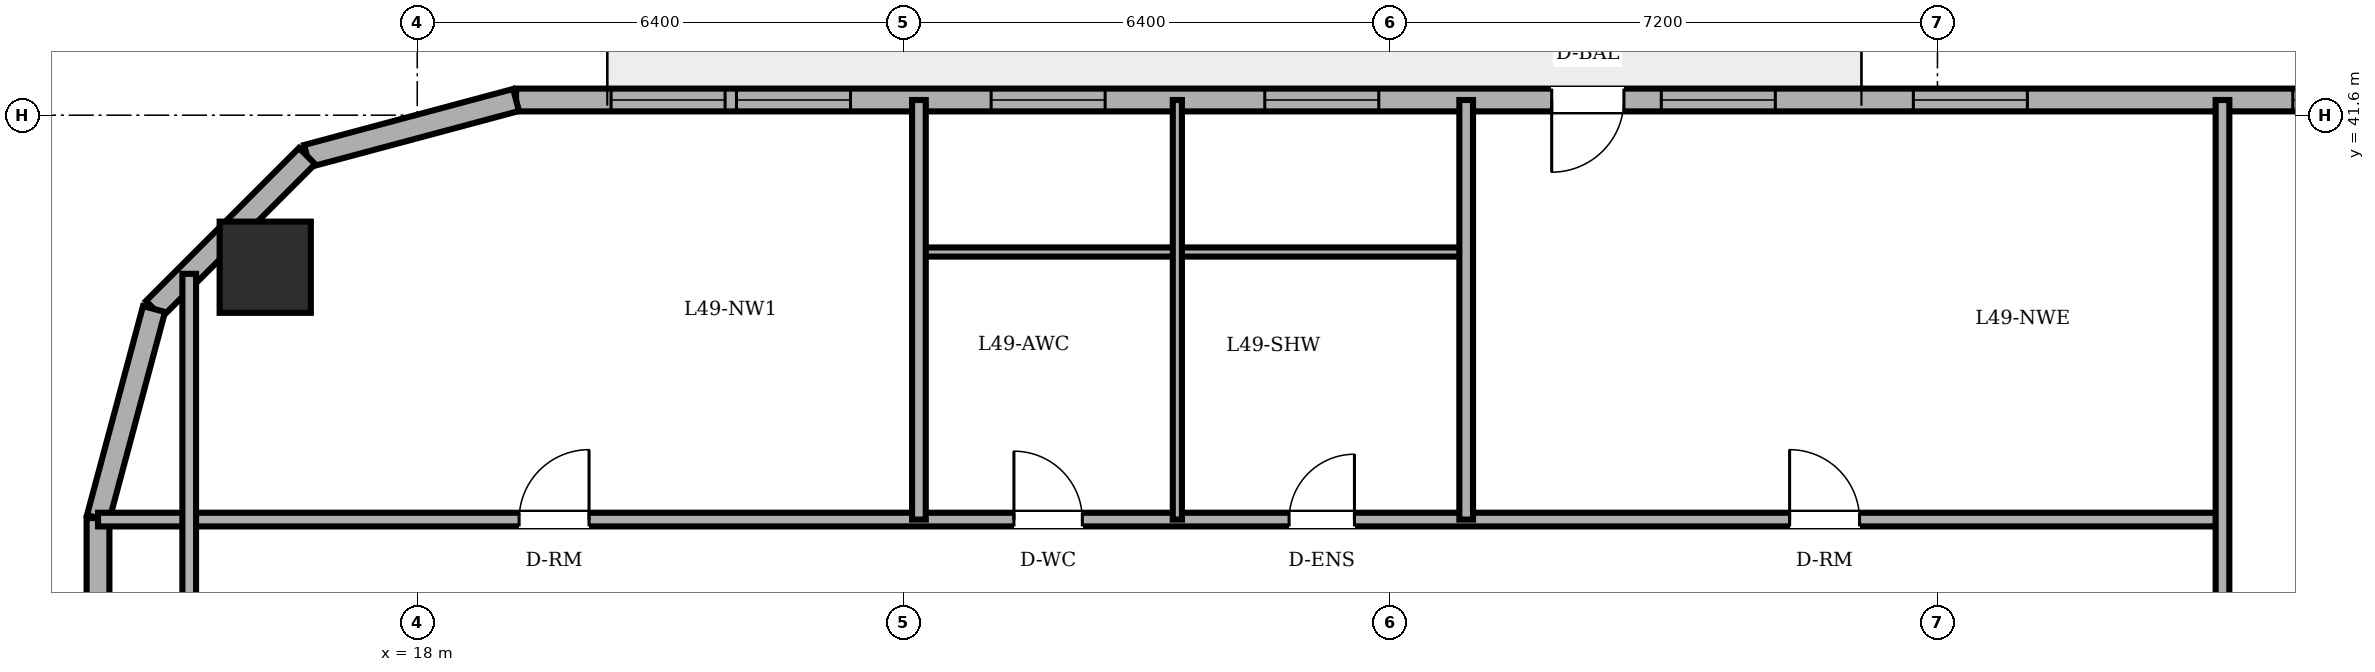
"""IFC4 building model, lengths in metres.
Left out: names, types, materials, properties, quantities, classifications, styles, units other than length and angle.
Written with IfcOpenShell. Run it as: python <this file> out.ifc"""

import sys

from ifc_helpers import new_model, si_unit, direction, frame, frame_2d, origin, origin_2d, place, context, subcontext, project, spatial, rectangle, circle, extrude, element, fill, save


model = new_model("IFC4")
c1 = context("Model", 3, precision=1e-05, world=origin(), true_north=direction((0.0, 1.0)))
c2 = subcontext(c1, "Body", "Model", "MODEL_VIEW")
j1 = project(units=[si_unit("LENGTHUNIT", "METRE"), si_unit("PLANEANGLEUNIT", "RADIAN")], contexts=[c1])
p1 = place(None, origin())
s1 = spatial("IfcSite", under=j1, at=p1, CompositionType="ELEMENT")
p2 = place(p1, origin())
s2 = spatial("IfcBuilding", under=s1, at=p2, CompositionType="ELEMENT")
p3 = place(p2, frame((0.0, 0.0, 187.0)))
s3 = spatial("IfcBuildingStorey", under=s2, at=p3, CompositionType="ELEMENT", Elevation=187.0)
p4 = place(p3, frame((16.0, 39.6, 0.0), z_axis=(0.0, 0.0, 1.0), x_axis=(1.0, 0.0, 0.0)))
e1 = element("IfcColumn", 1, at=p4, inside=s3, PredefinedType="COLUMN", context=c2, shape_type="SweptSolid", body=[
    extrude(circle(Radius=0.6, at=origin_2d()), origin(), (0.0, 0.0, 1.0), 3.6),
])
p5 = place(p3, frame((49.582, 41.8, 0.0), z_axis=(0.0, 0.0, 1.0), x_axis=(-1.0, 0.0, 0.0)))
e2 = element("IfcWall", 2, at=p5, inside=s3, PredefinedType="SOLIDWALL", context=c2, shape_type="SweptSolid", body=[
    extrude(rectangle(XDim=30.282, YDim=0.3, at=frame_2d((15.141, 0.0))), origin(), (0.0, 0.0, 1.0), 3.36),
])
p6 = place(p5, frame((15.707, 0.0, 0.0)))
e3 = element("IfcOpeningElement", 3, at=p6, cuts=e2, PredefinedType="OPENING", context=c2, shape_type="SweptSolid", body=[
    extrude(rectangle(XDim=0.95, YDim=2.2, at=frame_2d((0.475, 1.1))), frame((0.0, 0.16, 0.0), z_axis=(0.0, -1.0, 0.0), x_axis=(1.0, 0.0, 0.0)), (0.0, 0.0, 1.0), 0.32),
])
p7 = place(p5, frame((0.828, 0.0, 0.85)))
e4 = element("IfcOpeningElement", 4, at=p7, cuts=e2, PredefinedType="OPENING", context=c2, shape_type="SweptSolid", body=[
    extrude(rectangle(XDim=1.5, YDim=1.55, at=frame_2d((0.75, 0.775))), frame((0.0, 0.16, 0.0), z_axis=(0.0, -1.0, 0.0), x_axis=(1.0, 0.0, 0.0)), (0.0, 0.0, 1.0), 0.32),
])
p8 = place(p5, frame((3.731, 0.0, 0.85)))
e5 = element("IfcOpeningElement", 5, at=p8, cuts=e2, PredefinedType="OPENING", context=c2, shape_type="SweptSolid", body=[
    extrude(rectangle(XDim=1.5, YDim=1.55, at=frame_2d((0.75, 0.775))), frame((0.0, 0.16, 0.0), z_axis=(0.0, -1.0, 0.0), x_axis=(1.0, 0.0, 0.0)), (0.0, 0.0, 1.0), 0.32),
])
p9 = place(p5, frame((5.407, 0.0, 0.85)))
e6 = element("IfcOpeningElement", 6, at=p9, cuts=e2, PredefinedType="OPENING", context=c2, shape_type="SweptSolid", body=[
    extrude(rectangle(XDim=1.5, YDim=1.55, at=frame_2d((0.75, 0.775))), frame((0.0, 0.16, 0.0), z_axis=(0.0, -1.0, 0.0), x_axis=(1.0, 0.0, 0.0)), (0.0, 0.0, 1.0), 0.32),
])
p10 = place(p5, frame((10.399, 0.0, 0.85)))
e7 = element("IfcOpeningElement", 7, at=p10, cuts=e2, PredefinedType="OPENING", context=c2, shape_type="SweptSolid", body=[
    extrude(rectangle(XDim=1.5, YDim=1.55, at=frame_2d((0.75, 0.775))), frame((0.0, 0.16, 0.0), z_axis=(0.0, -1.0, 0.0), x_axis=(1.0, 0.0, 0.0)), (0.0, 0.0, 1.0), 0.32),
])
p11 = place(p5, frame((13.715, 0.0, 0.85)))
e8 = element("IfcOpeningElement", 8, at=p11, cuts=e2, PredefinedType="OPENING", context=c2, shape_type="SweptSolid", body=[
    extrude(rectangle(XDim=1.5, YDim=1.55, at=frame_2d((0.75, 0.775))), frame((0.0, 0.16, 0.0), z_axis=(0.0, -1.0, 0.0), x_axis=(1.0, 0.0, 0.0)), (0.0, 0.0, 1.0), 0.32),
])
p12 = place(p5, frame((18.932, 0.0, 0.85)))
e9 = element("IfcOpeningElement", 9, at=p12, cuts=e2, PredefinedType="OPENING", context=c2, shape_type="SweptSolid", body=[
    extrude(rectangle(XDim=1.5, YDim=1.55, at=frame_2d((0.75, 0.775))), frame((0.0, 0.16, 0.0), z_axis=(0.0, -1.0, 0.0), x_axis=(1.0, 0.0, 0.0)), (0.0, 0.0, 1.0), 0.32),
])
p13 = place(p5, frame((22.532, 0.0, 0.85)))
e10 = element("IfcOpeningElement", 10, at=p13, cuts=e2, PredefinedType="OPENING", context=c2, shape_type="SweptSolid", body=[
    extrude(rectangle(XDim=1.5, YDim=1.55, at=frame_2d((0.75, 0.775))), frame((0.0, 0.16, 0.0), z_axis=(0.0, -1.0, 0.0), x_axis=(1.0, 0.0, 0.0)), (0.0, 0.0, 1.0), 0.32),
])
p14 = place(p5, frame((25.882, 0.0, 0.85)))
e11 = element("IfcOpeningElement", 11, at=p14, cuts=e2, PredefinedType="OPENING", context=c2, shape_type="SweptSolid", body=[
    extrude(rectangle(XDim=1.5, YDim=1.55, at=frame_2d((0.75, 0.775))), frame((0.0, 0.16, 0.0), z_axis=(0.0, -1.0, 0.0), x_axis=(1.0, 0.0, 0.0)), (0.0, 0.0, 1.0), 0.32),
])
p15 = place(p5, frame((27.532, 0.0, 0.85)))
e12 = element("IfcOpeningElement", 12, at=p15, cuts=e2, PredefinedType="OPENING", context=c2, shape_type="SweptSolid", body=[
    extrude(rectangle(XDim=1.5, YDim=1.55, at=frame_2d((0.75, 0.775))), frame((0.0, 0.16, 0.0), z_axis=(0.0, -1.0, 0.0), x_axis=(1.0, 0.0, 0.0)), (0.0, 0.0, 1.0), 0.32),
])
p16 = place(p3, frame((19.3, 41.8, 0.0), z_axis=(0.0, 0.0, 1.0), x_axis=(-0.965908238586, -0.258884674387, 0.0)))
e13 = element("IfcWall", 13, at=p16, inside=s3, PredefinedType="SOLIDWALL", context=c2, shape_type="SweptSolid", body=[
    extrude(rectangle(XDim=2.847, YDim=0.3, at=frame_2d((1.424, 0.0))), origin(), (0.0, 0.0, 1.0), 3.36),
])
p17 = place(p3, frame((16.55, 41.063, 0.0), z_axis=(0.0, 0.0, 1.0), x_axis=(-0.707106781187, -0.707106781187, 0.0)))
e14 = element("IfcWall", 14, at=p17, inside=s3, PredefinedType="SOLIDWALL", context=c2, shape_type="SweptSolid", body=[
    extrude(rectangle(XDim=2.847, YDim=0.3, at=frame_2d((1.423, 0.0))), origin(), (0.0, 0.0, 1.0), 3.36),
])
p18 = place(p3, frame((14.537, 39.05, 0.0), z_axis=(0.0, 0.0, 1.0), x_axis=(-0.258884674387, -0.965908238586, 0.0)))
e15 = element("IfcWall", 15, at=p18, inside=s3, PredefinedType="SOLIDWALL", context=c2, shape_type="SweptSolid", body=[
    extrude(rectangle(XDim=2.847, YDim=0.3, at=frame_2d((1.424, 0.0))), origin(), (0.0, 0.0, 1.0), 3.36),
])
p19 = place(p3, frame((13.8, 36.3, 0.0), z_axis=(0.0, 0.0, 1.0), x_axis=(0.0, -1.0, 0.0)))
e16 = element("IfcWall", 16, at=p19, inside=s3, PredefinedType="SOLIDWALL", context=c2, shape_type="SweptSolid", body=[
    extrude(rectangle(XDim=24.6, YDim=0.3, at=frame_2d((12.3, 0.0))), origin(), (0.0, 0.0, 1.0), 3.36),
])
p20 = place(p19, frame((5.003, 0.0, 0.85)))
e17 = element("IfcOpeningElement", 17, at=p20, cuts=e16, PredefinedType="OPENING", context=c2, shape_type="SweptSolid", body=[
    extrude(rectangle(XDim=1.5, YDim=1.55, at=frame_2d((0.75, 0.775))), frame((0.0, 0.16, 0.0), z_axis=(0.0, -1.0, 0.0), x_axis=(1.0, 0.0, 0.0)), (0.0, 0.0, 1.0), 0.32),
])
p21 = place(p19, frame((8.277, 0.0, 0.85)))
e18 = element("IfcOpeningElement", 18, at=p21, cuts=e16, PredefinedType="OPENING", context=c2, shape_type="SweptSolid", body=[
    extrude(rectangle(XDim=1.5, YDim=1.55, at=frame_2d((0.75, 0.775))), frame((0.0, 0.16, 0.0), z_axis=(0.0, -1.0, 0.0), x_axis=(1.0, 0.0, 0.0)), (0.0, 0.0, 1.0), 0.32),
])
p22 = place(p19, frame((14.823, 0.0, 0.85)))
e19 = element("IfcOpeningElement", 19, at=p22, cuts=e16, PredefinedType="OPENING", context=c2, shape_type="SweptSolid", body=[
    extrude(rectangle(XDim=1.5, YDim=1.55, at=frame_2d((0.75, 0.775))), frame((0.0, 0.16, 0.0), z_axis=(0.0, -1.0, 0.0), x_axis=(1.0, 0.0, 0.0)), (0.0, 0.0, 1.0), 0.32),
])
p23 = place(p19, frame((18.097, 0.0, 0.85)))
e20 = element("IfcOpeningElement", 20, at=p23, cuts=e16, PredefinedType="OPENING", context=c2, shape_type="SweptSolid", body=[
    extrude(rectangle(XDim=1.5, YDim=1.55, at=frame_2d((0.75, 0.775))), frame((0.0, 0.16, 0.0), z_axis=(0.0, -1.0, 0.0), x_axis=(1.0, 0.0, 0.0)), (0.0, 0.0, 1.0), 0.32),
])
p24 = place(p3, frame((13.8, 36.28, 0.0), z_axis=(0.0, 0.0, 1.0), x_axis=(1.0, 0.0, 0.0)))
e21 = element("IfcWall", 21, at=p24, inside=s3, PredefinedType="PARTITIONING", context=c2, shape_type="SweptSolid", body=[
    extrude(rectangle(XDim=27.95, YDim=0.18, at=frame_2d((13.975, 0.0))), origin(), (0.0, 0.0, 1.0), 3.36),
])
p25 = place(p24, frame((12.05, 0.0, 0.0)))
e22 = element("IfcOpeningElement", 22, at=p25, cuts=e21, PredefinedType="OPENING", context=c2, shape_type="SweptSolid", body=[
    extrude(rectangle(XDim=0.9, YDim=2.1, at=frame_2d((0.45, 1.05))), frame((0.0, 0.1, 0.0), z_axis=(0.0, -1.0, 0.0), x_axis=(1.0, 0.0, 0.0)), (0.0, 0.0, 1.0), 0.2),
])
p26 = place(p24, frame((15.67, 0.0, 0.0)))
e23 = element("IfcOpeningElement", 23, at=p26, cuts=e21, PredefinedType="OPENING", context=c2, shape_type="SweptSolid", body=[
    extrude(rectangle(XDim=0.86, YDim=2.1, at=frame_2d((0.43, 1.05))), frame((0.0, 0.1, 0.0), z_axis=(0.0, -1.0, 0.0), x_axis=(1.0, 0.0, 0.0)), (0.0, 0.0, 1.0), 0.2),
])
p27 = place(p24, frame((5.54, 0.0, 0.0)))
e24 = element("IfcOpeningElement", 24, at=p27, cuts=e21, PredefinedType="OPENING", context=c2, shape_type="SweptSolid", body=[
    extrude(rectangle(XDim=0.92, YDim=2.1, at=frame_2d((0.46, 1.05))), frame((0.0, 0.1, 0.0), z_axis=(0.0, -1.0, 0.0), x_axis=(1.0, 0.0, 0.0)), (0.0, 0.0, 1.0), 0.2),
])
p28 = place(p24, frame((22.255, 0.0, 0.0)))
e25 = element("IfcOpeningElement", 25, at=p28, cuts=e21, PredefinedType="OPENING", context=c2, shape_type="SweptSolid", body=[
    extrude(rectangle(XDim=0.92, YDim=2.1, at=frame_2d((0.46, 1.05))), frame((0.0, 0.1, 0.0), z_axis=(0.0, -1.0, 0.0), x_axis=(1.0, 0.0, 0.0)), (0.0, 0.0, 1.0), 0.2),
])
p29 = place(p3, frame((24.6, 39.8, 0.0), z_axis=(0.0, 0.0, 1.0), x_axis=(1.0, 0.0, 0.0)))
e26 = element("IfcWall", 26, at=p29, inside=s3, PredefinedType="PARTITIONING", context=c2, shape_type="SweptSolid", body=[
    extrude(rectangle(XDim=7.2, YDim=0.12, at=frame_2d((3.6, 0.0))), origin(), (0.0, 0.0, 1.0), 2.842),
])
p30 = place(p3, frame((15.0, 33.82, 0.0), z_axis=(0.0, 0.0, 1.0), x_axis=(0.0, 1.0, 0.0)))
e27 = element("IfcWall", 27, at=p30, inside=s3, PredefinedType="PARTITIONING", context=c2, shape_type="SweptSolid", body=[
    extrude(rectangle(XDim=5.693, YDim=0.18, at=frame_2d((2.846, 0.0))), origin(), (0.0, 0.0, 1.0), 3.36),
])
p31 = place(p3, frame((24.6, 36.28, 0.0), z_axis=(0.0, 0.0, 1.0), x_axis=(0.0, 1.0, 0.0)))
e28 = element("IfcWall", 28, at=p31, inside=s3, PredefinedType="PARTITIONING", context=c2, shape_type="SweptSolid", body=[
    extrude(rectangle(XDim=5.52, YDim=0.18, at=frame_2d((2.76, 0.0))), origin(), (0.0, 0.0, 1.0), 3.36),
])
p32 = place(p3, frame((28.0, 36.28, 0.0), z_axis=(0.0, 0.0, 1.0), x_axis=(0.0, 1.0, 0.0)))
e29 = element("IfcWall", 29, at=p32, inside=s3, PredefinedType="PARTITIONING", context=c2, shape_type="SweptSolid", body=[
    extrude(rectangle(XDim=5.52, YDim=0.12, at=frame_2d((2.76, 0.0))), origin(), (0.0, 0.0, 1.0), 3.36),
])
p33 = place(p3, frame((31.8, 36.28, 0.0), z_axis=(0.0, 0.0, 1.0), x_axis=(0.0, 1.0, 0.0)))
e30 = element("IfcWall", 30, at=p33, inside=s3, PredefinedType="PARTITIONING", context=c2, shape_type="SweptSolid", body=[
    extrude(rectangle(XDim=5.52, YDim=0.18, at=frame_2d((2.76, 0.0))), origin(), (0.0, 0.0, 1.0), 3.36),
])
p34 = place(p3, frame((41.75, 25.18, 0.0), z_axis=(0.0, 0.0, 1.0), x_axis=(0.0, 1.0, 0.0)))
e31 = element("IfcWall", 31, at=p34, inside=s3, PredefinedType="PARTITIONING", context=c2, shape_type="SweptSolid", body=[
    extrude(rectangle(XDim=16.62, YDim=0.18, at=frame_2d((8.31, 0.0))), origin(), (0.0, 0.0, 1.0), 3.36),
])
p35 = place(p34, frame((5.35, 0.0, 0.0)))
e32 = element("IfcOpeningElement", 32, at=p35, cuts=e31, PredefinedType="OPENING", context=c2, shape_type="SweptSolid", body=[
    extrude(rectangle(XDim=0.92, YDim=2.1, at=frame_2d((0.46, 1.05))), frame((0.0, 0.1, 0.0), z_axis=(0.0, -1.0, 0.0), x_axis=(1.0, 0.0, 0.0)), (0.0, 0.0, 1.0), 0.2),
])
p36 = place(p6, origin())
e33 = element("IfcDoor", 33, at=p36, inside=s3, OperationType="SINGLE_SWING_RIGHT", PredefinedType="DOOR", context=c2, shape_type="SweptSolid", body=[
    extrude(rectangle(XDim=0.95, YDim=2.2, at=frame_2d((0.475, 1.1))), frame((0.0, 0.025, 0.0), z_axis=(0.0, -1.0, 0.0), x_axis=(1.0, 0.0, 0.0)), (0.0, 0.0, 1.0), 0.05),
])
fill(e3, e33)
p37 = place(p9, origin())
e34 = element("IfcWindow", 34, at=p37, inside=s3, PartitioningType="DOUBLE_PANEL_VERTICAL", PredefinedType="WINDOW", context=c2, shape_type="SweptSolid", body=[
    extrude(rectangle(XDim=1.5, YDim=1.55, at=frame_2d((0.75, 0.775))), frame((0.0, 0.03, 0.0), z_axis=(0.0, -1.0, 0.0), x_axis=(1.0, 0.0, 0.0)), (0.0, 0.0, 1.0), 0.06),
])
fill(e6, e34)
p38 = place(p10, origin())
e35 = element("IfcWindow", 35, at=p38, inside=s3, PartitioningType="DOUBLE_PANEL_VERTICAL", PredefinedType="WINDOW", context=c2, shape_type="SweptSolid", body=[
    extrude(rectangle(XDim=1.5, YDim=1.55, at=frame_2d((0.75, 0.775))), frame((0.0, 0.03, 0.0), z_axis=(0.0, -1.0, 0.0), x_axis=(1.0, 0.0, 0.0)), (0.0, 0.0, 1.0), 0.06),
])
fill(e7, e35)
p39 = place(p11, origin())
e36 = element("IfcWindow", 36, at=p39, inside=s3, PartitioningType="DOUBLE_PANEL_VERTICAL", PredefinedType="WINDOW", context=c2, shape_type="SweptSolid", body=[
    extrude(rectangle(XDim=1.5, YDim=1.55, at=frame_2d((0.75, 0.775))), frame((0.0, 0.03, 0.0), z_axis=(0.0, -1.0, 0.0), x_axis=(1.0, 0.0, 0.0)), (0.0, 0.0, 1.0), 0.06),
])
fill(e8, e36)
p40 = place(p12, origin())
e37 = element("IfcWindow", 37, at=p40, inside=s3, PartitioningType="DOUBLE_PANEL_VERTICAL", PredefinedType="WINDOW", context=c2, shape_type="SweptSolid", body=[
    extrude(rectangle(XDim=1.5, YDim=1.55, at=frame_2d((0.75, 0.775))), frame((0.0, 0.03, 0.0), z_axis=(0.0, -1.0, 0.0), x_axis=(1.0, 0.0, 0.0)), (0.0, 0.0, 1.0), 0.06),
])
fill(e9, e37)
p41 = place(p13, origin())
e38 = element("IfcWindow", 38, at=p41, inside=s3, PartitioningType="DOUBLE_PANEL_VERTICAL", PredefinedType="WINDOW", context=c2, shape_type="SweptSolid", body=[
    extrude(rectangle(XDim=1.5, YDim=1.55, at=frame_2d((0.75, 0.775))), frame((0.0, 0.03, 0.0), z_axis=(0.0, -1.0, 0.0), x_axis=(1.0, 0.0, 0.0)), (0.0, 0.0, 1.0), 0.06),
])
fill(e10, e38)
p42 = place(p14, origin())
e39 = element("IfcWindow", 39, at=p42, inside=s3, PartitioningType="DOUBLE_PANEL_VERTICAL", PredefinedType="WINDOW", context=c2, shape_type="SweptSolid", body=[
    extrude(rectangle(XDim=1.5, YDim=1.55, at=frame_2d((0.75, 0.775))), frame((0.0, 0.03, 0.0), z_axis=(0.0, -1.0, 0.0), x_axis=(1.0, 0.0, 0.0)), (0.0, 0.0, 1.0), 0.06),
])
fill(e11, e39)
p43 = place(p15, origin())
e40 = element("IfcWindow", 40, at=p43, inside=s3, PartitioningType="DOUBLE_PANEL_VERTICAL", PredefinedType="WINDOW", context=c2, shape_type="SweptSolid", body=[
    extrude(rectangle(XDim=1.5, YDim=1.55, at=frame_2d((0.75, 0.775))), frame((0.0, 0.03, 0.0), z_axis=(0.0, -1.0, 0.0), x_axis=(1.0, 0.0, 0.0)), (0.0, 0.0, 1.0), 0.06),
])
fill(e12, e40)
p44 = place(p25, origin())
e41 = element("IfcDoor", 41, at=p44, inside=s3, OperationType="SINGLE_SWING_LEFT", PredefinedType="DOOR", context=c2, shape_type="SweptSolid", body=[
    extrude(rectangle(XDim=0.9, YDim=2.1, at=frame_2d((0.45, 1.05))), frame((0.0, 0.025, 0.0), z_axis=(0.0, -1.0, 0.0), x_axis=(1.0, 0.0, 0.0)), (0.0, 0.0, 1.0), 0.05),
])
fill(e22, e41)
p45 = place(p26, origin())
e42 = element("IfcDoor", 42, at=p45, inside=s3, OperationType="SINGLE_SWING_RIGHT", PredefinedType="DOOR", context=c2, shape_type="SweptSolid", body=[
    extrude(rectangle(XDim=0.86, YDim=2.1, at=frame_2d((0.43, 1.05))), frame((0.0, 0.025, 0.0), z_axis=(0.0, -1.0, 0.0), x_axis=(1.0, 0.0, 0.0)), (0.0, 0.0, 1.0), 0.05),
])
fill(e23, e42)
p46 = place(p27, origin())
e43 = element("IfcDoor", 43, at=p46, inside=s3, OperationType="SINGLE_SWING_RIGHT", PredefinedType="DOOR", context=c2, shape_type="SweptSolid", body=[
    extrude(rectangle(XDim=0.92, YDim=2.1, at=frame_2d((0.46, 1.05))), frame((0.0, 0.025, 0.0), z_axis=(0.0, -1.0, 0.0), x_axis=(1.0, 0.0, 0.0)), (0.0, 0.0, 1.0), 0.05),
])
fill(e24, e43)
p47 = place(p28, origin())
e44 = element("IfcDoor", 44, at=p47, inside=s3, OperationType="SINGLE_SWING_LEFT", PredefinedType="DOOR", context=c2, shape_type="SweptSolid", body=[
    extrude(rectangle(XDim=0.92, YDim=2.1, at=frame_2d((0.46, 1.05))), frame((0.0, 0.025, 0.0), z_axis=(0.0, -1.0, 0.0), x_axis=(1.0, 0.0, 0.0)), (0.0, 0.0, 1.0), 0.05),
])
fill(e25, e44)
save(model, sys.argv[1])
